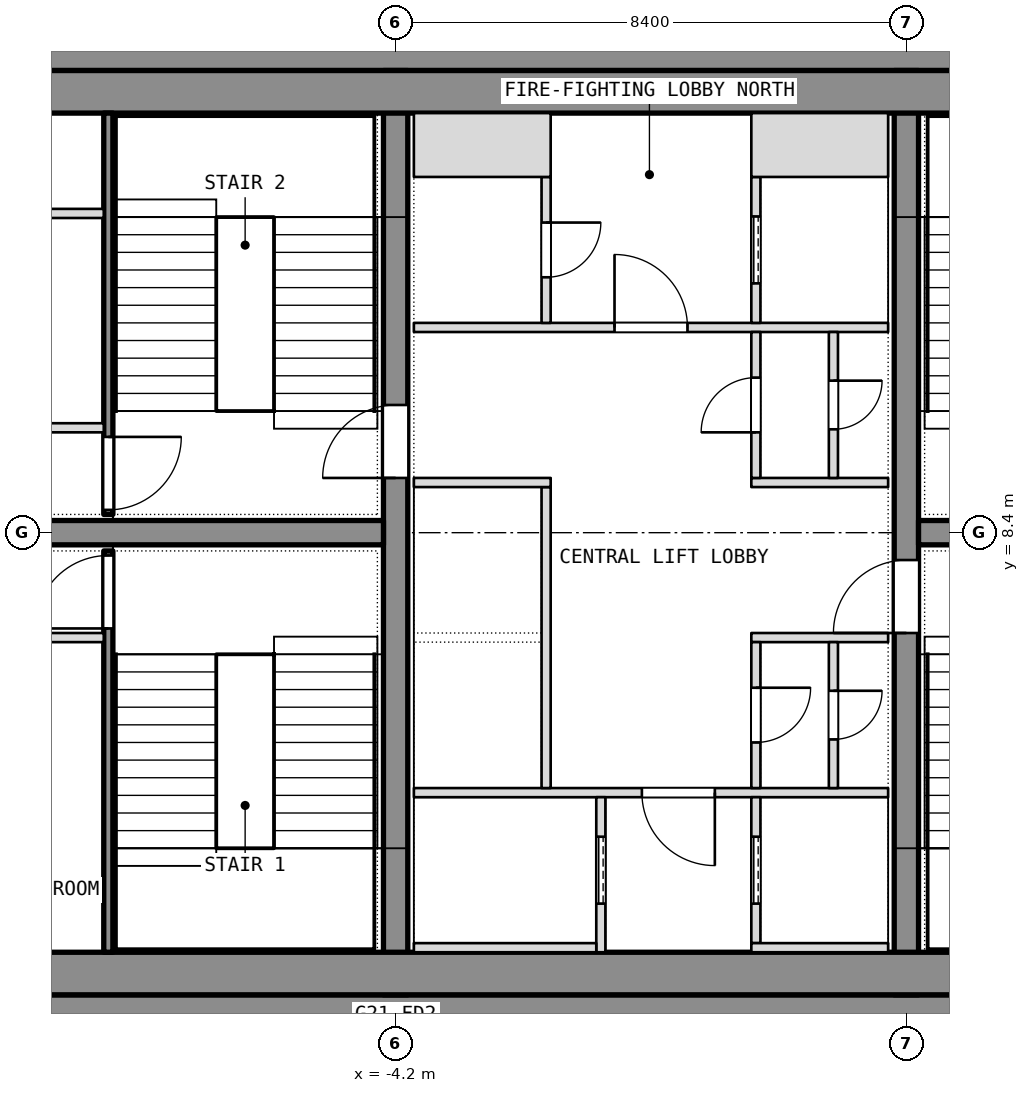
"""IFC4 building model, lengths in metres.
Left out: names, types, materials, properties, quantities, classifications, styles, units other than length and angle.
Written with IfcOpenShell. Run it as: python <this file> out.ifc"""

import sys

from ifc_helpers import new_model, si_unit, direction, frame, frame_2d, origin, place, context, subcontext, project, spatial, rectangle, extrude, element, fill, save


model = new_model("IFC4")
c1 = context("Model", 3, precision=1e-05, world=origin(), true_north=direction((0.0, 1.0)))
c2 = subcontext(c1, "Body", "Model", "MODEL_VIEW")
j1 = project(units=[si_unit("LENGTHUNIT", "METRE"), si_unit("PLANEANGLEUNIT", "RADIAN")], contexts=[c1])
p1 = place(None, origin())
s1 = spatial("IfcSite", under=j1, at=p1, CompositionType="ELEMENT")
p2 = place(p1, origin())
s2 = spatial("IfcBuilding", under=s1, at=p2, CompositionType="ELEMENT")
p3 = place(p2, frame((0.0, 0.0, 248.9)))
s3 = spatial("IfcBuildingStorey", under=s2, at=p3, CompositionType="ELEMENT", Elevation=248.9)
for number, where, z_axis, x_axis in (
    (1, (-11.1, 0.4, 0.0), (0.0, 0.0, 1.0), (1.0, 0.0, 0.0)),
    (2, (-11.1, 16.4, 0.0), (0.0, 0.0, 1.0), (1.0, 0.0, 0.0)),
):
    element("IfcWall", number, at=place(p3, frame(where, z_axis=z_axis, x_axis=x_axis)), inside=s3, PredefinedType="SHEAR", context=c2, shape_type="SweptSolid", body=[
        extrude(rectangle(XDim=22.2, YDim=0.8, at=frame_2d((11.1, 0.0))), origin(), (0.0, 0.0, 1.0), 3.6),
    ])
p4 = place(p3, frame((-4.2, 0.8, 0.0), z_axis=(0.0, 0.0, 1.0), x_axis=(0.0, 1.0, 0.0)))
e3 = element("IfcWall", 3, at=p4, inside=s3, PredefinedType="SHEAR", context=c2, shape_type="SweptSolid", body=[
    extrude(rectangle(XDim=15.2, YDim=0.4, at=frame_2d((7.6, 0.0))), origin(), (0.0, 0.0, 1.0), 3.6),
])
p5 = place(p4, frame((8.5, 0.0, 0.0)))
e4 = element("IfcOpeningElement", 4, at=p5, cuts=e3, PredefinedType="OPENING", context=c2, shape_type="SweptSolid", body=[
    extrude(rectangle(XDim=1.2, YDim=2.1, at=frame_2d((0.6, 1.05))), frame((0.0, 0.2, 0.0), z_axis=(0.0, -1.0, 0.0), x_axis=(1.0, 0.0, 0.0)), (0.0, 0.0, 1.0), 0.4),
])
p6 = place(p3, frame((4.2, 0.8, 0.0), z_axis=(0.0, 0.0, 1.0), x_axis=(0.0, 1.0, 0.0)))
e5 = element("IfcWall", 5, at=p6, inside=s3, PredefinedType="SHEAR", context=c2, shape_type="SweptSolid", body=[
    extrude(rectangle(XDim=15.2, YDim=0.4, at=frame_2d((7.6, 0.0))), origin(), (0.0, 0.0, 1.0), 3.6),
])
p7 = place(p6, frame((5.95, 0.0, 0.0)))
e6 = element("IfcOpeningElement", 6, at=p7, cuts=e5, PredefinedType="OPENING", context=c2, shape_type="SweptSolid", body=[
    extrude(rectangle(XDim=1.2, YDim=2.1, at=frame_2d((0.6, 1.05))), frame((0.0, 0.2, 0.0), z_axis=(0.0, -1.0, 0.0), x_axis=(1.0, 0.0, 0.0)), (0.0, 0.0, 1.0), 0.4),
])
for number, where, z_axis, x_axis in (
    (7, (-11.1, 8.4, 0.0), (0.0, 0.0, 1.0), (1.0, 0.0, 0.0)),
    (8, (4.4, 8.4, 0.0), (0.0, 0.0, 1.0), (1.0, 0.0, 0.0)),
):
    element("IfcWall", number, at=place(p3, frame(where, z_axis=z_axis, x_axis=x_axis)), inside=s3, PredefinedType="SHEAR", context=c2, shape_type="SweptSolid", body=[
        extrude(rectangle(XDim=6.7, YDim=0.4, at=frame_2d((3.35, 0.0))), origin(), (0.0, 0.0, 1.0), 3.6),
    ])
for number, where, z_axis, x_axis in (
    (9, (-11.1, 1.15, 0.0), (0.0, 0.0, 1.0), (1.0, 0.0, 0.0)),
    (10, (-11.1, 15.65, 0.0), (0.0, 0.0, 1.0), (1.0, 0.0, 0.0)),
):
    element("IfcWall", number, at=place(p3, frame(where, z_axis=z_axis, x_axis=x_axis)), inside=s3, PredefinedType="PARTITIONING", context=c2, shape_type="SweptSolid", body=[
        extrude(rectangle(XDim=22.2, YDim=0.7, at=frame_2d((11.1, 0.0))), origin(), (0.0, 0.0, 1.0), 3.3),
    ])
p8 = place(p3, frame((-8.925, 1.5, 0.0), z_axis=(0.0, 0.0, 1.0), x_axis=(0.0, 1.0, 0.0)))
e11 = element("IfcWall", 11, at=p8, inside=s3, PredefinedType="SHEAR", context=c2, shape_type="SweptSolid", body=[
    extrude(rectangle(XDim=6.6, YDim=0.15, at=frame_2d((3.3, 0.0))), origin(), (0.0, 0.0, 1.0), 3.3),
])
p9 = place(p8, frame((5.325, 0.0, 0.0)))
e12 = element("IfcOpeningElement", 12, at=p9, cuts=e11, PredefinedType="OPENING", context=c2, shape_type="SweptSolid", body=[
    extrude(rectangle(XDim=1.2, YDim=2.1, at=frame_2d((0.6, 1.05))), frame((0.0, 0.075, 0.0), z_axis=(0.0, -1.0, 0.0), x_axis=(1.0, 0.0, 0.0)), (0.0, 0.0, 1.0), 0.15),
])
p10 = place(p3, frame((-11.1, 6.675, 0.0), z_axis=(0.0, 0.0, 1.0), x_axis=(1.0, 0.0, 0.0)))
e13 = element("IfcWall", 13, at=p10, inside=s3, PredefinedType="PARTITIONING", context=c2, shape_type="SweptSolid", body=[
    extrude(rectangle(XDim=2.1, YDim=0.15, at=frame_2d((1.05, 0.0))), origin(), (0.0, 0.0, 1.0), 3.3),
])
p11 = place(p3, frame((-8.925, 8.7, 0.0), z_axis=(0.0, 0.0, 1.0), x_axis=(0.0, 1.0, 0.0)))
e14 = element("IfcWall", 14, at=p11, inside=s3, PredefinedType="SHEAR", context=c2, shape_type="SweptSolid", body=[
    extrude(rectangle(XDim=6.6, YDim=0.15, at=frame_2d((3.3, 0.0))), origin(), (0.0, 0.0, 1.0), 3.3),
])
p12 = place(p11, frame((0.075, 0.0, 0.0)))
e15 = element("IfcOpeningElement", 15, at=p12, cuts=e14, PredefinedType="OPENING", context=c2, shape_type="SweptSolid", body=[
    extrude(rectangle(XDim=1.2, YDim=2.1, at=frame_2d((0.6, 1.05))), frame((0.0, 0.075, 0.0), z_axis=(0.0, -1.0, 0.0), x_axis=(1.0, 0.0, 0.0)), (0.0, 0.0, 1.0), 0.15),
])
for number, where, z_axis, x_axis in (
    (16, (-11.1, 10.125, 0.0), (0.0, 0.0, 1.0), (1.0, 0.0, 0.0)),
    (17, (-11.1, 13.65, 0.0), (0.0, 0.0, 1.0), (1.0, 0.0, 0.0)),
):
    element("IfcWall", number, at=place(p3, frame(where, z_axis=z_axis, x_axis=x_axis)), inside=s3, PredefinedType="PARTITIONING", context=c2, shape_type="SweptSolid", body=[
        extrude(rectangle(XDim=2.1, YDim=0.15, at=frame_2d((1.05, 0.0))), origin(), (0.0, 0.0, 1.0), 3.3),
    ])
p13 = place(p3, frame((-3.9, 4.125, 0.0), z_axis=(0.0, 0.0, 1.0), x_axis=(1.0, 0.0, 0.0)))
e18 = element("IfcWall", 18, at=p13, inside=s3, PredefinedType="PARTITIONING", context=c2, shape_type="SweptSolid", body=[
    extrude(rectangle(XDim=7.8, YDim=0.15, at=frame_2d((3.9, 0.0))), origin(), (0.0, 0.0, 1.0), 3.3),
])
p14 = place(p13, frame((3.75, 0.0, 0.0)))
e19 = element("IfcOpeningElement", 19, at=p14, cuts=e18, PredefinedType="OPENING", context=c2, shape_type="SweptSolid", body=[
    extrude(rectangle(XDim=1.2, YDim=2.1, at=frame_2d((0.6, 1.05))), frame((0.0, 0.075, 0.0), z_axis=(0.0, -1.0, 0.0), x_axis=(1.0, 0.0, 0.0)), (0.0, 0.0, 1.0), 0.15),
])
p15 = place(p3, frame((-3.9, 11.775, 0.0), z_axis=(0.0, 0.0, 1.0), x_axis=(1.0, 0.0, 0.0)))
e20 = element("IfcWall", 20, at=p15, inside=s3, PredefinedType="PARTITIONING", context=c2, shape_type="SweptSolid", body=[
    extrude(rectangle(XDim=7.8, YDim=0.15, at=frame_2d((3.9, 0.0))), origin(), (0.0, 0.0, 1.0), 3.3),
])
p16 = place(p15, frame((3.3, 0.0, 0.0)))
e21 = element("IfcOpeningElement", 21, at=p16, cuts=e20, PredefinedType="OPENING", context=c2, shape_type="SweptSolid", body=[
    extrude(rectangle(XDim=1.2, YDim=2.1, at=frame_2d((0.6, 1.05))), frame((0.0, 0.075, 0.0), z_axis=(0.0, -1.0, 0.0), x_axis=(1.0, 0.0, 0.0)), (0.0, 0.0, 1.0), 0.15),
])
p17 = place(p3, frame((-0.825, 1.5, 0.0), z_axis=(0.0, 0.0, 1.0), x_axis=(0.0, 1.0, 0.0)))
e22 = element("IfcWall", 22, at=p17, inside=s3, PredefinedType="SHEAR", context=c2, shape_type="SweptSolid", body=[
    extrude(rectangle(XDim=2.55, YDim=0.15, at=frame_2d((1.275, 0.0))), origin(), (0.0, 0.0, 1.0), 3.6),
])
p18 = place(p17, frame((0.8, 0.0, 0.0)))
e23 = element("IfcOpeningElement", 23, at=p18, cuts=e22, PredefinedType="OPENING", context=c2, shape_type="SweptSolid", body=[
    extrude(rectangle(XDim=1.1, YDim=2.1, at=frame_2d((0.55, 1.05))), frame((0.0, 0.075, 0.0), z_axis=(0.0, -1.0, 0.0), x_axis=(1.0, 0.0, 0.0)), (0.0, 0.0, 1.0), 0.15),
])
p19 = place(p3, frame((-3.9, 1.575, 0.0), z_axis=(0.0, 0.0, 1.0), x_axis=(1.0, 0.0, 0.0)))
e24 = element("IfcWall", 24, at=p19, inside=s3, PredefinedType="SHEAR", context=c2, shape_type="SweptSolid", body=[
    extrude(rectangle(XDim=3.0, YDim=0.15, at=frame_2d((1.5, 0.0))), origin(), (0.0, 0.0, 1.0), 3.6),
])
p20 = place(p3, frame((-1.725, 4.2, 0.0), z_axis=(0.0, 0.0, 1.0), x_axis=(0.0, 1.0, 0.0)))
e25 = element("IfcWall", 25, at=p20, inside=s3, PredefinedType="SHEAR", context=c2, shape_type="SweptSolid", body=[
    extrude(rectangle(XDim=4.95, YDim=0.15, at=frame_2d((2.475, 0.0))), origin(), (0.0, 0.0, 1.0), 3.6),
])
p21 = place(p3, frame((-3.9, 9.225, 0.0), z_axis=(0.0, 0.0, 1.0), x_axis=(1.0, 0.0, 0.0)))
e26 = element("IfcWall", 26, at=p21, inside=s3, PredefinedType="SHEAR", context=c2, shape_type="SweptSolid", body=[
    extrude(rectangle(XDim=2.25, YDim=0.15, at=frame_2d((1.125, 0.0))), origin(), (0.0, 0.0, 1.0), 3.6),
])
p22 = place(p3, frame((-1.725, 11.85, 0.0), z_axis=(0.0, 0.0, 1.0), x_axis=(0.0, 1.0, 0.0)))
e27 = element("IfcWall", 27, at=p22, inside=s3, PredefinedType="PARTITIONING", context=c2, shape_type="SweptSolid", body=[
    extrude(rectangle(XDim=2.4, YDim=0.15, at=frame_2d((1.2, 0.0))), origin(), (0.0, 0.0, 1.0), 3.3),
])
p23 = place(p22, frame((0.75, 0.0, 0.0)))
e28 = element("IfcOpeningElement", 28, at=p23, cuts=e27, PredefinedType="OPENING", context=c2, shape_type="SweptSolid", body=[
    extrude(rectangle(XDim=0.9, YDim=2.1, at=frame_2d((0.45, 1.05))), frame((0.0, 0.075, 0.0), z_axis=(0.0, -1.0, 0.0), x_axis=(1.0, 0.0, 0.0)), (0.0, 0.0, 1.0), 0.15),
])
p24 = place(p3, frame((-3.9, 14.775, 0.0), z_axis=(0.0, 0.0, 1.0), x_axis=(1.0, 0.0, 0.0)))
e29 = element("IfcWall", 29, at=p24, inside=s3, PredefinedType="PARTITIONING", context=c2, shape_type="SweptSolid", body=[
    extrude(rectangle(XDim=2.25, YDim=1.05, at=frame_2d((1.125, 0.0))), origin(), (0.0, 0.0, 1.0), 3.3),
])
p25 = place(p3, frame((1.725, 1.65, 0.0), z_axis=(0.0, 0.0, 1.0), x_axis=(0.0, 1.0, 0.0)))
e30 = element("IfcWall", 30, at=p25, inside=s3, PredefinedType="SHEAR", context=c2, shape_type="SweptSolid", body=[
    extrude(rectangle(XDim=2.4, YDim=0.15, at=frame_2d((1.2, 0.0))), origin(), (0.0, 0.0, 1.0), 3.6),
])
p26 = place(p25, frame((0.65, 0.0, 0.0)))
e31 = element("IfcOpeningElement", 31, at=p26, cuts=e30, PredefinedType="OPENING", context=c2, shape_type="SweptSolid", body=[
    extrude(rectangle(XDim=1.1, YDim=2.1, at=frame_2d((0.55, 1.05))), frame((0.0, 0.075, 0.0), z_axis=(0.0, -1.0, 0.0), x_axis=(1.0, 0.0, 0.0)), (0.0, 0.0, 1.0), 0.15),
])
p27 = place(p3, frame((1.65, 1.575, 0.0), z_axis=(0.0, 0.0, 1.0), x_axis=(1.0, 0.0, 0.0)))
e32 = element("IfcWall", 32, at=p27, inside=s3, PredefinedType="SHEAR", context=c2, shape_type="SweptSolid", body=[
    extrude(rectangle(XDim=2.25, YDim=0.15, at=frame_2d((1.125, 0.0))), origin(), (0.0, 0.0, 1.0), 3.6),
])
p28 = place(p3, frame((1.725, 11.85, 0.0), z_axis=(0.0, 0.0, 1.0), x_axis=(0.0, 1.0, 0.0)))
e33 = element("IfcWall", 33, at=p28, inside=s3, PredefinedType="SHEAR", context=c2, shape_type="SweptSolid", body=[
    extrude(rectangle(XDim=2.4, YDim=0.15, at=frame_2d((1.2, 0.0))), origin(), (0.0, 0.0, 1.0), 3.6),
])
p29 = place(p28, frame((0.65, 0.0, 0.0)))
e34 = element("IfcOpeningElement", 34, at=p29, cuts=e33, PredefinedType="OPENING", context=c2, shape_type="SweptSolid", body=[
    extrude(rectangle(XDim=1.1, YDim=2.1, at=frame_2d((0.55, 1.05))), frame((0.0, 0.075, 0.0), z_axis=(0.0, -1.0, 0.0), x_axis=(1.0, 0.0, 0.0)), (0.0, 0.0, 1.0), 0.15),
])
p30 = place(p3, frame((1.65, 14.775, 0.0), z_axis=(0.0, 0.0, 1.0), x_axis=(1.0, 0.0, 0.0)))
e35 = element("IfcWall", 35, at=p30, inside=s3, PredefinedType="SHEAR", context=c2, shape_type="SweptSolid", body=[
    extrude(rectangle(XDim=2.25, YDim=1.05, at=frame_2d((1.125, 0.0))), origin(), (0.0, 0.0, 1.0), 3.6),
])
for number, where, z_axis, x_axis in (
    (36, (1.65, 6.675, 0.0), (0.0, 0.0, 1.0), (1.0, 0.0, 0.0)),
    (37, (1.65, 9.225, 0.0), (0.0, 0.0, 1.0), (1.0, 0.0, 0.0)),
):
    element("IfcWall", number, at=place(p3, frame(where, z_axis=z_axis, x_axis=x_axis)), inside=s3, PredefinedType="PARTITIONING", context=c2, shape_type="SweptSolid", body=[
        extrude(rectangle(XDim=2.25, YDim=0.15, at=frame_2d((1.125, 0.0))), origin(), (0.0, 0.0, 1.0), 3.3),
    ])
p31 = place(p3, frame((1.725, 4.2, 0.0), z_axis=(0.0, 0.0, 1.0), x_axis=(0.0, 1.0, 0.0)))
e38 = element("IfcWall", 38, at=p31, inside=s3, PredefinedType="PARTITIONING", context=c2, shape_type="SweptSolid", body=[
    extrude(rectangle(XDim=2.4, YDim=0.15, at=frame_2d((1.2, 0.0))), origin(), (0.0, 0.0, 1.0), 3.3),
])
p32 = place(p31, frame((0.75, 0.0, 0.0)))
e39 = element("IfcOpeningElement", 39, at=p32, cuts=e38, PredefinedType="OPENING", context=c2, shape_type="SweptSolid", body=[
    extrude(rectangle(XDim=0.9, YDim=2.1, at=frame_2d((0.45, 1.05))), frame((0.0, 0.075, 0.0), z_axis=(0.0, -1.0, 0.0), x_axis=(1.0, 0.0, 0.0)), (0.0, 0.0, 1.0), 0.15),
])
p33 = place(p3, frame((1.725, 9.3, 0.0), z_axis=(0.0, 0.0, 1.0), x_axis=(0.0, 1.0, 0.0)))
e40 = element("IfcWall", 40, at=p33, inside=s3, PredefinedType="PARTITIONING", context=c2, shape_type="SweptSolid", body=[
    extrude(rectangle(XDim=2.4, YDim=0.15, at=frame_2d((1.2, 0.0))), origin(), (0.0, 0.0, 1.0), 3.3),
])
p34 = place(p33, frame((0.75, 0.0, 0.0)))
e41 = element("IfcOpeningElement", 41, at=p34, cuts=e40, PredefinedType="OPENING", context=c2, shape_type="SweptSolid", body=[
    extrude(rectangle(XDim=0.9, YDim=2.1, at=frame_2d((0.45, 1.05))), frame((0.0, 0.075, 0.0), z_axis=(0.0, -1.0, 0.0), x_axis=(1.0, 0.0, 0.0)), (0.0, 0.0, 1.0), 0.15),
])
p35 = place(p3, frame((3.0, 4.2, 0.0), z_axis=(0.0, 0.0, 1.0), x_axis=(0.0, 1.0, 0.0)))
e42 = element("IfcWall", 42, at=p35, inside=s3, PredefinedType="PARTITIONING", context=c2, shape_type="SweptSolid", body=[
    extrude(rectangle(XDim=2.4, YDim=0.15, at=frame_2d((1.2, 0.0))), origin(), (0.0, 0.0, 1.0), 3.3),
])
p36 = place(p35, frame((0.8, 0.0, 0.0)))
e43 = element("IfcOpeningElement", 43, at=p36, cuts=e42, PredefinedType="OPENING", context=c2, shape_type="SweptSolid", body=[
    extrude(rectangle(XDim=0.8, YDim=2.1, at=frame_2d((0.4, 1.05))), frame((0.0, 0.075, 0.0), z_axis=(0.0, -1.0, 0.0), x_axis=(1.0, 0.0, 0.0)), (0.0, 0.0, 1.0), 0.15),
])
p37 = place(p3, frame((3.0, 9.3, 0.0), z_axis=(0.0, 0.0, 1.0), x_axis=(0.0, 1.0, 0.0)))
e44 = element("IfcWall", 44, at=p37, inside=s3, PredefinedType="PARTITIONING", context=c2, shape_type="SweptSolid", body=[
    extrude(rectangle(XDim=2.4, YDim=0.15, at=frame_2d((1.2, 0.0))), origin(), (0.0, 0.0, 1.0), 3.3),
])
p38 = place(p37, frame((0.8, 0.0, 0.0)))
e45 = element("IfcOpeningElement", 45, at=p38, cuts=e44, PredefinedType="OPENING", context=c2, shape_type="SweptSolid", body=[
    extrude(rectangle(XDim=0.8, YDim=2.1, at=frame_2d((0.4, 1.05))), frame((0.0, 0.075, 0.0), z_axis=(0.0, -1.0, 0.0), x_axis=(1.0, 0.0, 0.0)), (0.0, 0.0, 1.0), 0.15),
])
p39 = place(p9, origin())
e46 = element("IfcDoor", 46, at=p39, inside=s3, OperationType="SINGLE_SWING_LEFT", PredefinedType="DOOR", context=c2, shape_type="SweptSolid", body=[
    extrude(rectangle(XDim=1.2, YDim=2.1, at=frame_2d((0.6, 1.05))), frame((0.0, 0.025, 0.0), z_axis=(0.0, -1.0, 0.0), x_axis=(1.0, 0.0, 0.0)), (0.0, 0.0, 1.0), 0.05),
])
fill(e12, e46)
p40 = place(p12, origin())
e47 = element("IfcDoor", 47, at=p40, inside=s3, OperationType="SINGLE_SWING_LEFT", PredefinedType="DOOR", context=c2, shape_type="SweptSolid", body=[
    extrude(rectangle(XDim=1.2, YDim=2.1, at=frame_2d((0.6, 1.05))), frame((0.0, 0.025, 0.0), z_axis=(0.0, -1.0, 0.0), x_axis=(1.0, 0.0, 0.0)), (0.0, 0.0, 1.0), 0.05),
])
fill(e15, e47)
p41 = place(p32, origin())
e48 = element("IfcDoor", 48, at=p41, inside=s3, OperationType="SINGLE_SWING_LEFT", PredefinedType="DOOR", context=c2, shape_type="SweptSolid", body=[
    extrude(rectangle(XDim=0.9, YDim=2.1, at=frame_2d((0.45, 1.05))), frame((0.0, 0.025, 0.0), z_axis=(0.0, -1.0, 0.0), x_axis=(1.0, 0.0, 0.0)), (0.0, 0.0, 1.0), 0.05),
])
fill(e39, e48)
p42 = place(p36, origin())
e49 = element("IfcDoor", 49, at=p42, inside=s3, OperationType="SINGLE_SWING_LEFT", PredefinedType="DOOR", context=c2, shape_type="SweptSolid", body=[
    extrude(rectangle(XDim=0.8, YDim=2.1, at=frame_2d((0.4, 1.05))), frame((0.0, 0.025, 0.0), z_axis=(0.0, -1.0, 0.0), x_axis=(1.0, 0.0, 0.0)), (0.0, 0.0, 1.0), 0.05),
])
fill(e43, e49)
p43 = place(p34, origin())
e50 = element("IfcDoor", 50, at=p43, inside=s3, OperationType="SINGLE_SWING_LEFT", PredefinedType="DOOR", context=c2, shape_type="SweptSolid", body=[
    extrude(rectangle(XDim=0.9, YDim=2.1, at=frame_2d((0.45, 1.05))), frame((0.0, 0.025, 0.0), z_axis=(0.0, -1.0, 0.0), x_axis=(1.0, 0.0, 0.0)), (0.0, 0.0, 1.0), 0.05),
])
fill(e41, e50)
p44 = place(p38, origin())
e51 = element("IfcDoor", 51, at=p44, inside=s3, OperationType="SINGLE_SWING_LEFT", PredefinedType="DOOR", context=c2, shape_type="SweptSolid", body=[
    extrude(rectangle(XDim=0.8, YDim=2.1, at=frame_2d((0.4, 1.05))), frame((0.0, 0.025, 0.0), z_axis=(0.0, -1.0, 0.0), x_axis=(1.0, 0.0, 0.0)), (0.0, 0.0, 1.0), 0.05),
])
fill(e45, e51)
p45 = place(p18, origin())
e52 = element("IfcDoor", 52, at=p45, inside=s3, OperationType="SLIDING_TO_LEFT", PredefinedType="DOOR", context=c2, shape_type="SweptSolid", body=[
    extrude(rectangle(XDim=1.1, YDim=2.1, at=frame_2d((0.55, 1.05))), frame((0.0, 0.025, 0.0), z_axis=(0.0, -1.0, 0.0), x_axis=(1.0, 0.0, 0.0)), (0.0, 0.0, 1.0), 0.05),
])
fill(e23, e52)
p46 = place(p26, origin())
e53 = element("IfcDoor", 53, at=p46, inside=s3, OperationType="SLIDING_TO_LEFT", PredefinedType="DOOR", context=c2, shape_type="SweptSolid", body=[
    extrude(rectangle(XDim=1.1, YDim=2.1, at=frame_2d((0.55, 1.05))), frame((0.0, 0.025, 0.0), z_axis=(0.0, -1.0, 0.0), x_axis=(1.0, 0.0, 0.0)), (0.0, 0.0, 1.0), 0.05),
])
fill(e31, e53)
p47 = place(p29, origin())
e54 = element("IfcDoor", 54, at=p47, inside=s3, OperationType="SLIDING_TO_LEFT", PredefinedType="DOOR", context=c2, shape_type="SweptSolid", body=[
    extrude(rectangle(XDim=1.1, YDim=2.1, at=frame_2d((0.55, 1.05))), frame((0.0, 0.025, 0.0), z_axis=(0.0, -1.0, 0.0), x_axis=(1.0, 0.0, 0.0)), (0.0, 0.0, 1.0), 0.05),
])
fill(e34, e54)
p48 = place(p14, origin())
e55 = element("IfcDoor", 55, at=p48, inside=s3, OperationType="SINGLE_SWING_LEFT", PredefinedType="DOOR", context=c2, shape_type="SweptSolid", body=[
    extrude(rectangle(XDim=1.2, YDim=2.1, at=frame_2d((0.6, 1.05))), frame((0.0, 0.025, 0.0), z_axis=(0.0, -1.0, 0.0), x_axis=(1.0, 0.0, 0.0)), (0.0, 0.0, 1.0), 0.05),
])
fill(e19, e55)
p49 = place(p16, origin())
e56 = element("IfcDoor", 56, at=p49, inside=s3, OperationType="SINGLE_SWING_LEFT", PredefinedType="DOOR", context=c2, shape_type="SweptSolid", body=[
    extrude(rectangle(XDim=1.2, YDim=2.1, at=frame_2d((0.6, 1.05))), frame((0.0, 0.025, 0.0), z_axis=(0.0, -1.0, 0.0), x_axis=(1.0, 0.0, 0.0)), (0.0, 0.0, 1.0), 0.05),
])
fill(e21, e56)
p50 = place(p23, origin())
e57 = element("IfcDoor", 57, at=p50, inside=s3, OperationType="SINGLE_SWING_LEFT", PredefinedType="DOOR", context=c2, shape_type="SweptSolid", body=[
    extrude(rectangle(XDim=0.9, YDim=2.1, at=frame_2d((0.45, 1.05))), frame((0.0, 0.025, 0.0), z_axis=(0.0, -1.0, 0.0), x_axis=(1.0, 0.0, 0.0)), (0.0, 0.0, 1.0), 0.05),
])
fill(e28, e57)
p51 = place(p5, origin())
e58 = element("IfcDoor", 58, at=p51, inside=s3, OperationType="SINGLE_SWING_LEFT", PredefinedType="DOOR", context=c2, shape_type="SweptSolid", body=[
    extrude(rectangle(XDim=1.2, YDim=2.1, at=frame_2d((0.6, 1.05))), frame((0.0, 0.025, 0.0), z_axis=(0.0, -1.0, 0.0), x_axis=(1.0, 0.0, 0.0)), (0.0, 0.0, 1.0), 0.05),
])
fill(e4, e58)
p52 = place(p7, origin())
e59 = element("IfcDoor", 59, at=p52, inside=s3, OperationType="SINGLE_SWING_LEFT", PredefinedType="DOOR", context=c2, shape_type="SweptSolid", body=[
    extrude(rectangle(XDim=1.2, YDim=2.1, at=frame_2d((0.6, 1.05))), frame((0.0, 0.025, 0.0), z_axis=(0.0, -1.0, 0.0), x_axis=(1.0, 0.0, 0.0)), (0.0, 0.0, 1.0), 0.05),
])
fill(e6, e59)
save(model, sys.argv[1])
